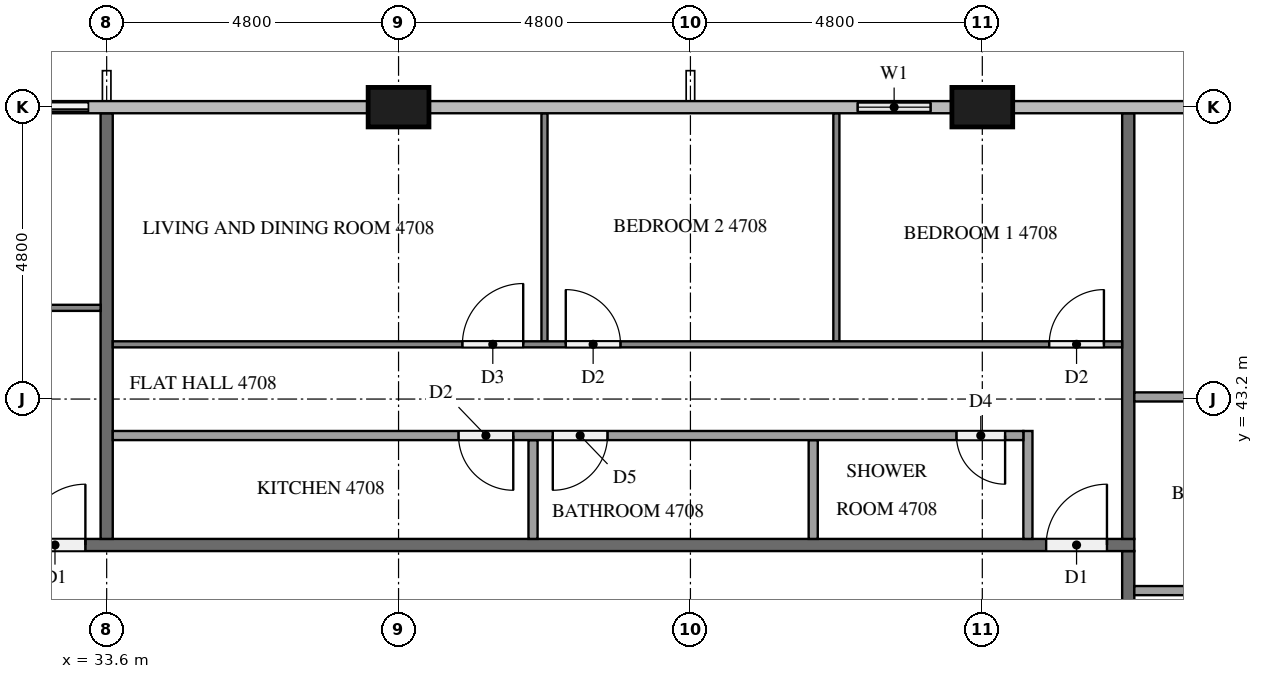
"""IFC4 building model, lengths in metres.
Left out: names, types, materials, properties, quantities, classifications, styles, units other than length and angle.
Written with IfcOpenShell. Run it as: python <this file> out.ifc"""

import sys

from ifc_helpers import new_model, si_unit, direction, frame, frame_2d, origin, origin_2d, place, context, subcontext, project, spatial, rectangle, extrude, element, fill, save


model = new_model("IFC4")
c1 = context("Model", 3, precision=1e-05, world=origin(), true_north=direction((0.0, 1.0)))
c2 = subcontext(c1, "Body", "Model", "MODEL_VIEW")
j1 = project(units=[si_unit("LENGTHUNIT", "METRE"), si_unit("PLANEANGLEUNIT", "RADIAN")], contexts=[c1])
p1 = place(None, origin())
s1 = spatial("IfcSite", under=j1, at=p1, CompositionType="ELEMENT")
p2 = place(p1, origin())
s2 = spatial("IfcBuilding", under=s1, at=p2, CompositionType="ELEMENT")
p3 = place(p2, frame((0.0, 0.0, 182.4)))
s3 = spatial("IfcBuildingStorey", under=s2, at=p3, CompositionType="ELEMENT", Elevation=182.4)
for number, where, z_axis, x_axis in (
    (1, (48.0, 48.0, 0.0), (0.0, 0.0, 1.0), (1.0, 0.0, 0.0)),
    (2, (38.4, 48.0, 0.0), (0.0, 0.0, 1.0), (1.0, 0.0, 0.0)),
):
    element("IfcColumn", number, at=place(p3, frame(where, z_axis=z_axis, x_axis=x_axis)), inside=s3, PredefinedType="COLUMN", context=c2, shape_type="SweptSolid", body=[
        extrude(rectangle(XDim=1.0, YDim=0.65, at=origin_2d()), origin(), (0.0, 0.0, 1.0), 3.2),
    ])
p4 = place(p3, frame((47.5, 48.0, 0.0), z_axis=(0.0, 0.0, 1.0), x_axis=(-1.0, 0.0, 0.0)))
e3 = element("IfcWall", 3, at=p4, inside=s3, PredefinedType="SOLIDWALL", context=c2, shape_type="SweptSolid", body=[
    extrude(rectangle(XDim=1.9, YDim=0.15, at=frame_2d((0.95, 0.0))), origin(), (0.0, 0.0, 1.0), 3.2),
])
p5 = place(p4, frame((0.35, 0.0, 0.9)))
e4 = element("IfcOpeningElement", 4, at=p5, cuts=e3, PredefinedType="OPENING", context=c2, shape_type="SweptSolid", body=[
    extrude(rectangle(XDim=1.2, YDim=1.4, at=frame_2d((0.6, 0.7))), frame((0.0, 0.085, 0.0), z_axis=(0.0, -1.0, 0.0), x_axis=(1.0, 0.0, 0.0)), (0.0, 0.0, 1.0), 0.17),
])
p6 = place(p3, frame((33.6, 48.0, 0.0), z_axis=(0.0, 0.0, 1.0), x_axis=(-1.0, 0.0, 0.0)))
e5 = element("IfcWall", 5, at=p6, inside=s3, PredefinedType="SOLIDWALL", context=c2, shape_type="SweptSolid", body=[
    extrude(rectangle(XDim=2.4, YDim=0.15, at=frame_2d((1.2, 0.0))), origin(), (0.0, 0.0, 1.0), 3.2),
])
p7 = place(p6, frame((0.3, 0.0, 0.0)))
e6 = element("IfcOpeningElement", 6, at=p7, cuts=e5, PredefinedType="OPENING", context=c2, shape_type="SweptSolid", body=[
    extrude(rectangle(XDim=1.8, YDim=2.4, at=frame_2d((0.9, 1.2))), frame((0.0, 0.085, 0.0), z_axis=(0.0, -1.0, 0.0), x_axis=(1.0, 0.0, 0.0)), (0.0, 0.0, 1.0), 0.17),
])
p8 = place(p3, frame((50.4, 40.7, 0.0), z_axis=(0.0, 0.0, 1.0), x_axis=(0.0, -1.0, 0.0)))
e7 = element("IfcWall", 7, at=p8, inside=s3, PredefinedType="PARTITIONING", context=c2, shape_type="SweptSolid", body=[
    extrude(rectangle(XDim=28.6, YDim=0.2, at=frame_2d((14.3, 0.0))), origin(), (0.0, 0.0, 1.0), 3.2),
])
p9 = place(p8, frame((27.3, 0.0, 0.0)))
e8 = element("IfcOpeningElement", 8, at=p9, cuts=e7, PredefinedType="OPENING", context=c2, shape_type="SweptSolid", body=[
    extrude(rectangle(XDim=1.1, YDim=2.1, at=frame_2d((0.55, 1.05))), frame((0.0, 0.11, 0.0), z_axis=(0.0, -1.0, 0.0), x_axis=(1.0, 0.0, 0.0)), (0.0, 0.0, 1.0), 0.22),
])
p10 = place(p8, frame((8.15, 0.0, 0.0)))
e9 = element("IfcOpeningElement", 9, at=p10, cuts=e7, PredefinedType="OPENING", context=c2, shape_type="SweptSolid", body=[
    extrude(rectangle(XDim=1.0, YDim=2.1, at=frame_2d((0.5, 1.05))), frame((0.0, 0.11, 0.0), z_axis=(0.0, -1.0, 0.0), x_axis=(1.0, 0.0, 0.0)), (0.0, 0.0, 1.0), 0.22),
])
p11 = place(p8, frame((0.95, 0.0, 0.0)))
e10 = element("IfcOpeningElement", 10, at=p11, cuts=e7, PredefinedType="OPENING", context=c2, shape_type="SweptSolid", body=[
    extrude(rectangle(XDim=1.0, YDim=2.1, at=frame_2d((0.5, 1.05))), frame((0.0, 0.11, 0.0), z_axis=(0.0, -1.0, 0.0), x_axis=(1.0, 0.0, 0.0)), (0.0, 0.0, 1.0), 0.22),
])
p12 = place(p3, frame((11.9, 40.8, 0.0), z_axis=(0.0, 0.0, 1.0), x_axis=(1.0, 0.0, 0.0)))
e11 = element("IfcWall", 11, at=p12, inside=s3, PredefinedType="PARTITIONING", context=c2, shape_type="SweptSolid", body=[
    extrude(rectangle(XDim=38.6, YDim=0.2, at=frame_2d((19.3, 0.0))), origin(), (0.0, 0.0, 1.0), 3.2),
])
p13 = place(p12, frame((37.15, 0.0, 0.0)))
e12 = element("IfcOpeningElement", 12, at=p13, cuts=e11, PredefinedType="OPENING", context=c2, shape_type="SweptSolid", body=[
    extrude(rectangle(XDim=1.0, YDim=2.1, at=frame_2d((0.5, 1.05))), frame((0.0, 0.11, 0.0), z_axis=(0.0, -1.0, 0.0), x_axis=(1.0, 0.0, 0.0)), (0.0, 0.0, 1.0), 0.22),
])
p14 = place(p12, frame((20.35, 0.0, 0.0)))
e13 = element("IfcOpeningElement", 13, at=p14, cuts=e11, PredefinedType="OPENING", context=c2, shape_type="SweptSolid", body=[
    extrude(rectangle(XDim=1.0, YDim=2.1, at=frame_2d((0.5, 1.05))), frame((0.0, 0.11, 0.0), z_axis=(0.0, -1.0, 0.0), x_axis=(1.0, 0.0, 0.0)), (0.0, 0.0, 1.0), 0.22),
])
p15 = place(p12, frame((13.15, 0.0, 0.0)))
e14 = element("IfcOpeningElement", 14, at=p15, cuts=e11, PredefinedType="OPENING", context=c2, shape_type="SweptSolid", body=[
    extrude(rectangle(XDim=1.0, YDim=2.1, at=frame_2d((0.5, 1.05))), frame((0.0, 0.11, 0.0), z_axis=(0.0, -1.0, 0.0), x_axis=(1.0, 0.0, 0.0)), (0.0, 0.0, 1.0), 0.22),
])
for number, where, z_axis, x_axis in (
    (15, (50.4, 40.9, 0.0), (0.0, 0.0, 1.0), (0.0, 1.0, 0.0)),
    (16, (33.6, 47.9, 0.0), (0.0, 0.0, 1.0), (0.0, -1.0, 0.0)),
):
    element("IfcWall", number, at=place(p3, frame(where, z_axis=z_axis, x_axis=x_axis)), inside=s3, PredefinedType="PARTITIONING", context=c2, shape_type="SweptSolid", body=[
        extrude(rectangle(XDim=7.0, YDim=0.2, at=frame_2d((3.5, 0.0))), origin(), (0.0, 0.0, 1.0), 3.2),
    ])
p16 = place(p3, frame((50.5, 43.235, 0.0), z_axis=(0.0, 0.0, 1.0), x_axis=(1.0, 0.0, 0.0)))
e17 = element("IfcWall", 17, at=p16, inside=s3, PredefinedType="PARTITIONING", context=c2, shape_type="SweptSolid", body=[
    extrude(rectangle(XDim=3.725, YDim=0.15, at=frame_2d((1.863, 0.0))), origin(), (0.0, 0.0, 1.0), 3.2),
])
p17 = place(p3, frame((50.5, 40.05, 0.0), z_axis=(0.0, 0.0, 1.0), x_axis=(1.0, 0.0, 0.0)))
e18 = element("IfcWall", 18, at=p17, inside=s3, PredefinedType="PARTITIONING", context=c2, shape_type="SweptSolid", body=[
    extrude(rectangle(XDim=3.875, YDim=0.15, at=frame_2d((1.938, 0.0))), origin(), (0.0, 0.0, 1.0), 3.2),
])
for number, where, z_axis, x_axis in (
    (19, (45.6, 44.15, 0.0), (0.0, 0.0, 1.0), (0.0, 1.0, 0.0)),
    (20, (40.8, 44.15, 0.0), (0.0, 0.0, 1.0), (0.0, 1.0, 0.0)),
):
    element("IfcWall", number, at=place(p3, frame(where, z_axis=z_axis, x_axis=x_axis)), inside=s3, PredefinedType="PARTITIONING", context=c2, shape_type="SweptSolid", body=[
        extrude(rectangle(XDim=3.75, YDim=0.1, at=frame_2d((1.875, 0.0))), origin(), (0.0, 0.0, 1.0), 3.2),
    ])
p18 = place(p3, frame((33.7, 44.1, 0.0), z_axis=(0.0, 0.0, 1.0), x_axis=(1.0, 0.0, 0.0)))
e21 = element("IfcWall", 21, at=p18, inside=s3, PredefinedType="PARTITIONING", context=c2, shape_type="SweptSolid", body=[
    extrude(rectangle(XDim=16.6, YDim=0.1, at=frame_2d((8.3, 0.0))), origin(), (0.0, 0.0, 1.0), 3.2),
])
p19 = place(p18, frame((15.4, 0.0, 0.0)))
e22 = element("IfcOpeningElement", 22, at=p19, cuts=e21, PredefinedType="OPENING", context=c2, shape_type="SweptSolid", body=[
    extrude(rectangle(XDim=0.9, YDim=2.1, at=frame_2d((0.45, 1.05))), frame((0.0, 0.06, 0.0), z_axis=(0.0, -1.0, 0.0), x_axis=(1.0, 0.0, 0.0)), (0.0, 0.0, 1.0), 0.12),
])
p20 = place(p18, frame((7.45, 0.0, 0.0)))
e23 = element("IfcOpeningElement", 23, at=p20, cuts=e21, PredefinedType="OPENING", context=c2, shape_type="SweptSolid", body=[
    extrude(rectangle(XDim=0.9, YDim=2.1, at=frame_2d((0.45, 1.05))), frame((0.0, 0.06, 0.0), z_axis=(0.0, -1.0, 0.0), x_axis=(1.0, 0.0, 0.0)), (0.0, 0.0, 1.0), 0.12),
])
p21 = place(p18, frame((5.75, 0.0, 0.0)))
e24 = element("IfcOpeningElement", 24, at=p21, cuts=e21, PredefinedType="OPENING", context=c2, shape_type="SweptSolid", body=[
    extrude(rectangle(XDim=1.0, YDim=2.1, at=frame_2d((0.5, 1.05))), frame((0.0, 0.06, 0.0), z_axis=(0.0, -1.0, 0.0), x_axis=(1.0, 0.0, 0.0)), (0.0, 0.0, 1.0), 0.12),
])
for number, where, z_axis, x_axis in (
    (25, (45.219, 40.9, 0.0), (0.0, 0.0, 1.0), (0.0, 1.0, 0.0)),
    (26, (40.612, 40.9, 0.0), (0.0, 0.0, 1.0), (0.0, 1.0, 0.0)),
):
    element("IfcWall", number, at=place(p3, frame(where, z_axis=z_axis, x_axis=x_axis)), inside=s3, PredefinedType="PARTITIONING", context=c2, shape_type="SweptSolid", body=[
        extrude(rectangle(XDim=1.625, YDim=0.15, at=frame_2d((0.812, 0.0))), origin(), (0.0, 0.0, 1.0), 3.2),
    ])
p22 = place(p3, frame((48.75, 40.9, 0.0), z_axis=(0.0, 0.0, 1.0), x_axis=(0.0, 1.0, 0.0)))
e27 = element("IfcWall", 27, at=p22, inside=s3, PredefinedType="PARTITIONING", context=c2, shape_type="SweptSolid", body=[
    extrude(rectangle(XDim=1.775, YDim=0.15, at=frame_2d((0.888, 0.0))), origin(), (0.0, 0.0, 1.0), 3.2),
])
p23 = place(p3, frame((48.675, 42.6, 0.0), z_axis=(0.0, 0.0, 1.0), x_axis=(-1.0, 0.0, 0.0)))
e28 = element("IfcWall", 28, at=p23, inside=s3, PredefinedType="PARTITIONING", context=c2, shape_type="SweptSolid", body=[
    extrude(rectangle(XDim=14.975, YDim=0.15, at=frame_2d((7.488, 0.0))), origin(), (0.0, 0.0, 1.0), 3.2),
])
p24 = place(p23, frame((0.3, 0.0, 0.0)))
e29 = element("IfcOpeningElement", 29, at=p24, cuts=e28, PredefinedType="OPENING", context=c2, shape_type="SweptSolid", body=[
    extrude(rectangle(XDim=0.8, YDim=2.1, at=frame_2d((0.4, 1.05))), frame((0.0, 0.085, 0.0), z_axis=(0.0, -1.0, 0.0), x_axis=(1.0, 0.0, 0.0)), (0.0, 0.0, 1.0), 0.17),
])
p25 = place(p23, frame((6.838, 0.0, 0.0)))
e30 = element("IfcOpeningElement", 30, at=p25, cuts=e28, PredefinedType="OPENING", context=c2, shape_type="SweptSolid", body=[
    extrude(rectangle(XDim=0.9, YDim=2.1, at=frame_2d((0.45, 1.05))), frame((0.0, 0.085, 0.0), z_axis=(0.0, -1.0, 0.0), x_axis=(1.0, 0.0, 0.0)), (0.0, 0.0, 1.0), 0.17),
])
p26 = place(p23, frame((8.388, 0.0, 0.0)))
e31 = element("IfcOpeningElement", 31, at=p26, cuts=e28, PredefinedType="OPENING", context=c2, shape_type="SweptSolid", body=[
    extrude(rectangle(XDim=0.9, YDim=2.1, at=frame_2d((0.45, 1.05))), frame((0.0, 0.085, 0.0), z_axis=(0.0, -1.0, 0.0), x_axis=(1.0, 0.0, 0.0)), (0.0, 0.0, 1.0), 0.17),
])
p27 = place(p3, frame((26.5, 44.7, 0.0), z_axis=(0.0, 0.0, 1.0), x_axis=(1.0, 0.0, 0.0)))
e32 = element("IfcWall", 32, at=p27, inside=s3, PredefinedType="PARTITIONING", context=c2, shape_type="SweptSolid", body=[
    extrude(rectangle(XDim=7.0, YDim=0.1, at=frame_2d((3.5, 0.0))), origin(), (0.0, 0.0, 1.0), 3.2),
])
p28 = place(p27, frame((0.3, 0.0, 0.0)))
e33 = element("IfcOpeningElement", 33, at=p28, cuts=e32, PredefinedType="OPENING", context=c2, shape_type="SweptSolid", body=[
    extrude(rectangle(XDim=1.0, YDim=2.1, at=frame_2d((0.5, 1.05))), frame((0.0, 0.06, 0.0), z_axis=(0.0, -1.0, 0.0), x_axis=(1.0, 0.0, 0.0)), (0.0, 0.0, 1.0), 0.12),
])
p29 = place(p5, origin())
e34 = element("IfcWindow", 34, at=p29, inside=s3, PartitioningType="SINGLE_PANEL", PredefinedType="WINDOW", context=c2, shape_type="SweptSolid", body=[
    extrude(rectangle(XDim=1.2, YDim=1.4, at=frame_2d((0.6, 0.7))), frame((0.0, 0.03, 0.0), z_axis=(0.0, -1.0, 0.0), x_axis=(1.0, 0.0, 0.0)), (0.0, 0.0, 1.0), 0.06),
])
fill(e4, e34)
p30 = place(p7, origin())
e35 = element("IfcDoor", 35, at=p30, inside=s3, OperationType="SLIDING_TO_LEFT", PredefinedType="DOOR", context=c2, shape_type="SweptSolid", body=[
    extrude(rectangle(XDim=1.8, YDim=2.4, at=frame_2d((0.9, 1.2))), frame((0.0, 0.025, 0.0), z_axis=(0.0, -1.0, 0.0), x_axis=(1.0, 0.0, 0.0)), (0.0, 0.0, 1.0), 0.05),
])
fill(e6, e35)
p31 = place(p13, origin())
e36 = element("IfcDoor", 36, at=p31, inside=s3, OperationType="SINGLE_SWING_RIGHT", PredefinedType="DOOR", context=c2, shape_type="SweptSolid", body=[
    extrude(rectangle(XDim=1.0, YDim=2.1, at=frame_2d((0.5, 1.05))), frame((0.0, 0.025, 0.0), z_axis=(0.0, -1.0, 0.0), x_axis=(1.0, 0.0, 0.0)), (0.0, 0.0, 1.0), 0.05),
])
fill(e12, e36)
p32 = place(p14, origin())
e37 = element("IfcDoor", 37, at=p32, inside=s3, OperationType="SINGLE_SWING_RIGHT", PredefinedType="DOOR", context=c2, shape_type="SweptSolid", body=[
    extrude(rectangle(XDim=1.0, YDim=2.1, at=frame_2d((0.5, 1.05))), frame((0.0, 0.025, 0.0), z_axis=(0.0, -1.0, 0.0), x_axis=(1.0, 0.0, 0.0)), (0.0, 0.0, 1.0), 0.05),
])
fill(e13, e37)
p33 = place(p19, origin())
e38 = element("IfcDoor", 38, at=p33, inside=s3, OperationType="SINGLE_SWING_RIGHT", PredefinedType="DOOR", context=c2, shape_type="SweptSolid", body=[
    extrude(rectangle(XDim=0.9, YDim=2.1, at=frame_2d((0.45, 1.05))), frame((0.0, 0.025, 0.0), z_axis=(0.0, -1.0, 0.0), x_axis=(1.0, 0.0, 0.0)), (0.0, 0.0, 1.0), 0.05),
])
fill(e22, e38)
p34 = place(p20, origin())
e39 = element("IfcDoor", 39, at=p34, inside=s3, OperationType="SINGLE_SWING_LEFT", PredefinedType="DOOR", context=c2, shape_type="SweptSolid", body=[
    extrude(rectangle(XDim=0.9, YDim=2.1, at=frame_2d((0.45, 1.05))), frame((0.0, 0.025, 0.0), z_axis=(0.0, -1.0, 0.0), x_axis=(1.0, 0.0, 0.0)), (0.0, 0.0, 1.0), 0.05),
])
fill(e23, e39)
p35 = place(p21, origin())
e40 = element("IfcDoor", 40, at=p35, inside=s3, OperationType="SINGLE_SWING_RIGHT", PredefinedType="DOOR", context=c2, shape_type="SweptSolid", body=[
    extrude(rectangle(XDim=1.0, YDim=2.1, at=frame_2d((0.5, 1.05))), frame((0.0, 0.025, 0.0), z_axis=(0.0, -1.0, 0.0), x_axis=(1.0, 0.0, 0.0)), (0.0, 0.0, 1.0), 0.05),
])
fill(e24, e40)
p36 = place(p24, origin())
e41 = element("IfcDoor", 41, at=p36, inside=s3, OperationType="SINGLE_SWING_LEFT", PredefinedType="DOOR", context=c2, shape_type="SweptSolid", body=[
    extrude(rectangle(XDim=0.8, YDim=2.1, at=frame_2d((0.4, 1.05))), frame((0.0, 0.025, 0.0), z_axis=(0.0, -1.0, 0.0), x_axis=(1.0, 0.0, 0.0)), (0.0, 0.0, 1.0), 0.05),
])
fill(e29, e41)
p37 = place(p25, origin())
e42 = element("IfcDoor", 42, at=p37, inside=s3, OperationType="SINGLE_SWING_RIGHT", PredefinedType="DOOR", context=c2, shape_type="SweptSolid", body=[
    extrude(rectangle(XDim=0.9, YDim=2.1, at=frame_2d((0.45, 1.05))), frame((0.0, 0.025, 0.0), z_axis=(0.0, -1.0, 0.0), x_axis=(1.0, 0.0, 0.0)), (0.0, 0.0, 1.0), 0.05),
])
fill(e30, e42)
p38 = place(p26, origin())
e43 = element("IfcDoor", 43, at=p38, inside=s3, OperationType="SINGLE_SWING_LEFT", PredefinedType="DOOR", context=c2, shape_type="SweptSolid", body=[
    extrude(rectangle(XDim=0.9, YDim=2.1, at=frame_2d((0.45, 1.05))), frame((0.0, 0.025, 0.0), z_axis=(0.0, -1.0, 0.0), x_axis=(1.0, 0.0, 0.0)), (0.0, 0.0, 1.0), 0.05),
])
fill(e31, e43)
save(model, sys.argv[1])
